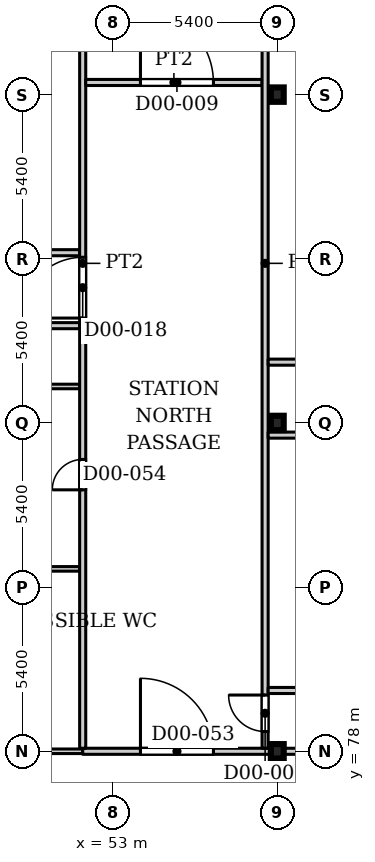
"""IFC4 building model, lengths in metres.
Left out: names, types, materials, properties, quantities, classifications, styles, units other than length and angle.
Written with IfcOpenShell. Run it as: python <this file> out.ifc"""

import sys

from ifc_helpers import new_model, si_unit, direction, frame, frame_2d, origin, origin_2d, place, context, subcontext, project, spatial, rectangle, i_section, extrude, source, transform, mapped, element, fill, save


model = new_model("IFC4")
c1 = context("Model", 3, precision=1e-05, world=origin(), true_north=direction((0.0, 1.0)))
c2 = subcontext(c1, "Body", "Model", "MODEL_VIEW")
j1 = project(units=[si_unit("LENGTHUNIT", "METRE"), si_unit("PLANEANGLEUNIT", "RADIAN")], contexts=[c1])
p1 = place(None, origin())
s1 = spatial("IfcSite", under=j1, at=p1, CompositionType="ELEMENT")
p2 = place(p1, origin())
s2 = spatial("IfcBuilding", under=s1, at=p2, CompositionType="ELEMENT")
p3 = place(p2, origin())
s3 = spatial("IfcBuildingStorey", under=s2, at=p3, CompositionType="ELEMENT", Elevation=0.0)
for number, where, z_axis, x_axis in (
    (1, (58.4, 78.0, 0.0), (0.0, 0.0, 1.0), (1.0, 0.0, 0.0)),
    (2, (58.4, 88.8, 0.0), (0.0, 0.0, 1.0), (1.0, 0.0, 0.0)),
    (3, (58.4, 99.6, 0.0), (0.0, 0.0, 1.0), (1.0, 0.0, 0.0)),
):
    element("IfcColumn", number, at=place(p3, frame(where, z_axis=z_axis, x_axis=x_axis)), inside=s3, PredefinedType="COLUMN", context=c2, shape_type="SweptSolid", body=[
        extrude(i_section(OverallWidth=0.424, OverallDepth=0.474, WebThickness=0.048, FlangeThickness=0.077, FilletRadius=0.014, at=origin_2d()), origin(), (0.0, 0.0, 1.0), 7.5),
    ])
p4 = place(p3, frame((36.45, 92.0, 0.0), z_axis=(0.0, 0.0, 1.0), x_axis=(1.0, 0.0, 0.0)))
e4 = element("IfcWall", 4, at=p4, inside=s3, PredefinedType="PARTITIONING", context=c2, shape_type="SweptSolid", body=[
    extrude(rectangle(XDim=15.45, YDim=0.2, at=frame_2d((7.725, 0.0))), origin(), (0.0, 0.0, 1.0), 7.08),
])
p5 = place(p4, frame((3.9, 0.0, 0.0)))
e5 = element("IfcOpeningElement", 5, at=p5, cuts=e4, PredefinedType="OPENING", context=c2, shape_type="SweptSolid", body=[
    extrude(rectangle(XDim=1.0, YDim=2.1, at=frame_2d((0.5, 1.05))), frame((0.0, 0.11, 0.0), z_axis=(0.0, -1.0, 0.0), x_axis=(1.0, 0.0, 0.0)), (0.0, 0.0, 1.0), 0.22),
])
p6 = place(p4, frame((11.783, 0.0, 0.0)))
e6 = element("IfcOpeningElement", 6, at=p6, cuts=e4, PredefinedType="OPENING", context=c2, shape_type="SweptSolid", body=[
    extrude(rectangle(XDim=1.0, YDim=2.1, at=frame_2d((0.5, 1.05))), frame((0.0, 0.11, 0.0), z_axis=(0.0, -1.0, 0.0), x_axis=(1.0, 0.0, 0.0)), (0.0, 0.0, 1.0), 0.22),
])
p7 = place(p3, frame((36.45, 94.4, 0.0), z_axis=(0.0, 0.0, 1.0), x_axis=(1.0, 0.0, 0.0)))
e7 = element("IfcWall", 7, at=p7, inside=s3, PredefinedType="PARTITIONING", context=c2, shape_type="SweptSolid", body=[
    extrude(rectangle(XDim=15.45, YDim=0.2, at=frame_2d((7.725, 0.0))), origin(), (0.0, 0.0, 1.0), 7.08),
])
p8 = place(p7, frame((0.567, 0.0, 0.0)))
e8 = element("IfcOpeningElement", 8, at=p8, cuts=e7, PredefinedType="OPENING", context=c2, shape_type="SweptSolid", body=[
    extrude(rectangle(XDim=1.0, YDim=2.1, at=frame_2d((0.5, 1.05))), frame((0.0, 0.11, 0.0), z_axis=(0.0, -1.0, 0.0), x_axis=(1.0, 0.0, 0.0)), (0.0, 0.0, 1.0), 0.22),
])
p9 = place(p7, frame((8.4, 0.0, 0.0)))
e9 = element("IfcOpeningElement", 9, at=p9, cuts=e7, PredefinedType="OPENING", context=c2, shape_type="SweptSolid", body=[
    extrude(rectangle(XDim=1.0, YDim=2.1, at=frame_2d((0.5, 1.05))), frame((0.0, 0.11, 0.0), z_axis=(0.0, -1.0, 0.0), x_axis=(1.0, 0.0, 0.0)), (0.0, 0.0, 1.0), 0.22),
])
p10 = place(p3, frame((48.075, 78.0, 0.0), z_axis=(0.0, 0.0, 1.0), x_axis=(1.0, 0.0, 0.0)))
e10 = element("IfcWall", 10, at=p10, inside=s3, PredefinedType="PARTITIONING", context=c2, shape_type="SweptSolid", body=[
    extrude(rectangle(XDim=3.925, YDim=0.15, at=frame_2d((1.962, 0.0))), origin(), (0.0, 0.0, 1.0), 7.08),
])
p11 = place(p10, frame((1.525, 0.0, 0.0)))
e11 = element("IfcOpeningElement", 11, at=p11, cuts=e10, PredefinedType="OPENING", context=c2, shape_type="SweptSolid", body=[
    extrude(rectangle(XDim=1.0, YDim=2.1, at=frame_2d((0.5, 1.05))), frame((0.0, 0.085, 0.0), z_axis=(0.0, -1.0, 0.0), x_axis=(1.0, 0.0, 0.0)), (0.0, 0.0, 1.0), 0.17),
])
for number, where, z_axis, x_axis in (
    (12, (48.075, 84.0, 0.0), (0.0, 0.0, 1.0), (1.0, 0.0, 0.0)),
    (13, (48.075, 90.0, 0.0), (0.0, 0.0, 1.0), (1.0, 0.0, 0.0)),
):
    element("IfcWall", number, at=place(p3, frame(where, z_axis=z_axis, x_axis=x_axis)), inside=s3, PredefinedType="PARTITIONING", context=c2, shape_type="SweptSolid", body=[
        extrude(rectangle(XDim=3.825, YDim=0.15, at=frame_2d((1.913, 0.0))), origin(), (0.0, 0.0, 1.0), 7.08),
    ])
p12 = place(p3, frame((52.0, 78.0, 0.0), z_axis=(0.0, 0.0, 1.0), x_axis=(1.0, 0.0, 0.0)))
e14 = element("IfcWall", 14, at=p12, inside=s3, PredefinedType="PARTITIONING", context=c2, shape_type="SweptSolid", body=[
    extrude(rectangle(XDim=15.9, YDim=0.2, at=frame_2d((7.95, 0.0))), origin(), (0.0, 0.0, 1.0), 7.08),
])
p13 = place(p12, frame((1.9, 0.0, 0.0)))
e15 = element("IfcOpeningElement", 15, at=p13, cuts=e14, PredefinedType="OPENING", context=c2, shape_type="SweptSolid", body=[
    extrude(rectangle(XDim=2.4, YDim=2.1, at=frame_2d((1.2, 1.05))), frame((0.0, 0.11, 0.0), z_axis=(0.0, -1.0, 0.0), x_axis=(1.0, 0.0, 0.0)), (0.0, 0.0, 1.0), 0.22),
])
p14 = place(p3, frame((52.0, 78.1, 0.0), z_axis=(0.0, 0.0, 1.0), x_axis=(0.0, 1.0, 0.0)))
e16 = element("IfcWall", 16, at=p14, inside=s3, PredefinedType="PARTITIONING", context=c2, shape_type="SweptSolid", body=[
    extrude(rectangle(XDim=31.9, YDim=0.2, at=frame_2d((15.95, 0.0))), origin(), (0.0, 0.0, 1.0), 7.08),
])
p15 = place(p14, frame((14.15, 0.0, 0.0)))
e17 = element("IfcOpeningElement", 17, at=p15, cuts=e16, PredefinedType="OPENING", context=c2, shape_type="SweptSolid", body=[
    extrude(rectangle(XDim=2.0, YDim=2.1, at=frame_2d((1.0, 1.05))), frame((0.0, 0.11, 0.0), z_axis=(0.0, -1.0, 0.0), x_axis=(1.0, 0.0, 0.0)), (0.0, 0.0, 1.0), 0.22),
])
p16 = place(p14, frame((8.5, 0.0, 0.0)))
e18 = element("IfcOpeningElement", 18, at=p16, cuts=e16, PredefinedType="OPENING", context=c2, shape_type="SweptSolid", body=[
    extrude(rectangle(XDim=1.0, YDim=2.1, at=frame_2d((0.5, 1.05))), frame((0.0, 0.11, 0.0), z_axis=(0.0, -1.0, 0.0), x_axis=(1.0, 0.0, 0.0)), (0.0, 0.0, 1.0), 0.22),
])
p17 = place(p3, frame((52.1, 100.0, 0.0), z_axis=(0.0, 0.0, 1.0), x_axis=(1.0, 0.0, 0.0)))
e19 = element("IfcWall", 19, at=p17, inside=s3, PredefinedType="PARTITIONING", context=c2, shape_type="SweptSolid", body=[
    extrude(rectangle(XDim=5.8, YDim=0.2, at=frame_2d((2.9, 0.0))), origin(), (0.0, 0.0, 1.0), 7.08),
])
p18 = place(p17, frame((1.8, 0.0, 0.0)))
e20 = element("IfcOpeningElement", 20, at=p18, cuts=e19, PredefinedType="OPENING", context=c2, shape_type="SweptSolid", body=[
    extrude(rectangle(XDim=2.4, YDim=2.1, at=frame_2d((1.2, 1.05))), frame((0.0, 0.11, 0.0), z_axis=(0.0, -1.0, 0.0), x_axis=(1.0, 0.0, 0.0)), (0.0, 0.0, 1.0), 0.22),
])
p19 = place(p3, frame((58.0, 78.1, 0.0), z_axis=(0.0, 0.0, 1.0), x_axis=(0.0, 1.0, 0.0)))
e21 = element("IfcWall", 21, at=p19, inside=s3, PredefinedType="PARTITIONING", context=c2, shape_type="SweptSolid", body=[
    extrude(rectangle(XDim=31.9, YDim=0.2, at=frame_2d((15.95, 0.0))), origin(), (0.0, 0.0, 1.0), 7.08),
])
p20 = place(p19, frame((0.55, 0.0, 0.0)))
e22 = element("IfcOpeningElement", 22, at=p20, cuts=e21, PredefinedType="OPENING", context=c2, shape_type="SweptSolid", body=[
    extrude(rectangle(XDim=1.2, YDim=2.1, at=frame_2d((0.6, 1.05))), frame((0.0, 0.11, 0.0), z_axis=(0.0, -1.0, 0.0), x_axis=(1.0, 0.0, 0.0)), (0.0, 0.0, 1.0), 0.22),
])
p21 = place(p3, frame((58.1, 80.0, 0.0), z_axis=(0.0, 0.0, 1.0), x_axis=(1.0, 0.0, 0.0)))
e23 = element("IfcWall", 23, at=p21, inside=s3, PredefinedType="PARTITIONING", context=c2, shape_type="SweptSolid", body=[
    extrude(rectangle(XDim=49.8, YDim=0.2, at=frame_2d((24.9, 0.0))), origin(), (0.0, 0.0, 1.0), 7.08),
])
p22 = place(p3, frame((58.1, 88.4, 0.0), z_axis=(0.0, 0.0, 1.0), x_axis=(1.0, 0.0, 0.0)))
e24 = element("IfcWall", 24, at=p22, inside=s3, PredefinedType="PARTITIONING", context=c2, shape_type="SweptSolid", body=[
    extrude(rectangle(XDim=49.8, YDim=0.2, at=frame_2d((24.9, 0.0))), origin(), (0.0, 0.0, 1.0), 7.08),
])
p23 = place(p22, frame((5.05, 0.0, 0.0)))
e25 = element("IfcOpeningElement", 25, at=p23, cuts=e24, PredefinedType="OPENING", context=c2, shape_type="SweptSolid", body=[
    extrude(rectangle(XDim=1.0, YDim=2.1, at=frame_2d((0.5, 1.05))), frame((0.0, 0.11, 0.0), z_axis=(0.0, -1.0, 0.0), x_axis=(1.0, 0.0, 0.0)), (0.0, 0.0, 1.0), 0.22),
])
p24 = place(p22, frame((15.414, 0.0, 0.0)))
e26 = element("IfcOpeningElement", 26, at=p24, cuts=e24, PredefinedType="OPENING", context=c2, shape_type="SweptSolid", body=[
    extrude(rectangle(XDim=1.0, YDim=2.1, at=frame_2d((0.5, 1.05))), frame((0.0, 0.11, 0.0), z_axis=(0.0, -1.0, 0.0), x_axis=(1.0, 0.0, 0.0)), (0.0, 0.0, 1.0), 0.22),
])
p25 = place(p22, frame((24.505, 0.0, 0.0)))
e27 = element("IfcOpeningElement", 27, at=p25, cuts=e24, PredefinedType="OPENING", context=c2, shape_type="SweptSolid", body=[
    extrude(rectangle(XDim=1.0, YDim=2.1, at=frame_2d((0.5, 1.05))), frame((0.0, 0.11, 0.0), z_axis=(0.0, -1.0, 0.0), x_axis=(1.0, 0.0, 0.0)), (0.0, 0.0, 1.0), 0.22),
])
p26 = place(p22, frame((34.595, 0.0, 0.0)))
e28 = element("IfcOpeningElement", 28, at=p26, cuts=e24, PredefinedType="OPENING", context=c2, shape_type="SweptSolid", body=[
    extrude(rectangle(XDim=1.0, YDim=2.1, at=frame_2d((0.5, 1.05))), frame((0.0, 0.11, 0.0), z_axis=(0.0, -1.0, 0.0), x_axis=(1.0, 0.0, 0.0)), (0.0, 0.0, 1.0), 0.22),
])
p27 = place(p22, frame((44.959, 0.0, 0.0)))
e29 = element("IfcOpeningElement", 29, at=p27, cuts=e24, PredefinedType="OPENING", context=c2, shape_type="SweptSolid", body=[
    extrude(rectangle(XDim=1.0, YDim=2.1, at=frame_2d((0.5, 1.05))), frame((0.0, 0.11, 0.0), z_axis=(0.0, -1.0, 0.0), x_axis=(1.0, 0.0, 0.0)), (0.0, 0.0, 1.0), 0.22),
])
p28 = place(p3, frame((58.1, 90.8, 0.0), z_axis=(0.0, 0.0, 1.0), x_axis=(1.0, 0.0, 0.0)))
e30 = element("IfcWall", 30, at=p28, inside=s3, PredefinedType="PARTITIONING", context=c2, shape_type="SweptSolid", body=[
    extrude(rectangle(XDim=49.8, YDim=0.2, at=frame_2d((24.9, 0.0))), origin(), (0.0, 0.0, 1.0), 7.08),
])
p29 = place(p28, frame((4.914, 0.0, 0.0)))
e31 = element("IfcOpeningElement", 31, at=p29, cuts=e30, PredefinedType="OPENING", context=c2, shape_type="SweptSolid", body=[
    extrude(rectangle(XDim=1.2, YDim=2.1, at=frame_2d((0.6, 1.05))), frame((0.0, 0.11, 0.0), z_axis=(0.0, -1.0, 0.0), x_axis=(1.0, 0.0, 0.0)), (0.0, 0.0, 1.0), 0.22),
])
p30 = place(p28, frame((15.205, 0.0, 0.0)))
e32 = element("IfcOpeningElement", 32, at=p30, cuts=e30, PredefinedType="OPENING", context=c2, shape_type="SweptSolid", body=[
    extrude(rectangle(XDim=1.0, YDim=2.1, at=frame_2d((0.5, 1.05))), frame((0.0, 0.11, 0.0), z_axis=(0.0, -1.0, 0.0), x_axis=(1.0, 0.0, 0.0)), (0.0, 0.0, 1.0), 0.22),
])
p31 = place(p28, frame((24.295, 0.0, 0.0)))
e33 = element("IfcOpeningElement", 33, at=p31, cuts=e30, PredefinedType="OPENING", context=c2, shape_type="SweptSolid", body=[
    extrude(rectangle(XDim=1.0, YDim=2.1, at=frame_2d((0.5, 1.05))), frame((0.0, 0.11, 0.0), z_axis=(0.0, -1.0, 0.0), x_axis=(1.0, 0.0, 0.0)), (0.0, 0.0, 1.0), 0.22),
])
p32 = place(p28, frame((34.659, 0.0, 0.0)))
e34 = element("IfcOpeningElement", 34, at=p32, cuts=e30, PredefinedType="OPENING", context=c2, shape_type="SweptSolid", body=[
    extrude(rectangle(XDim=1.0, YDim=2.1, at=frame_2d((0.5, 1.05))), frame((0.0, 0.11, 0.0), z_axis=(0.0, -1.0, 0.0), x_axis=(1.0, 0.0, 0.0)), (0.0, 0.0, 1.0), 0.22),
])
p33 = place(p28, frame((44.75, 0.0, 0.0)))
e35 = element("IfcOpeningElement", 35, at=p33, cuts=e30, PredefinedType="OPENING", context=c2, shape_type="SweptSolid", body=[
    extrude(rectangle(XDim=1.0, YDim=2.1, at=frame_2d((0.5, 1.05))), frame((0.0, 0.11, 0.0), z_axis=(0.0, -1.0, 0.0), x_axis=(1.0, 0.0, 0.0)), (0.0, 0.0, 1.0), 0.22),
])
m1 = source(origin(), c2, "Body", "SweptSolid", [
    extrude(rectangle(XDim=1.2, YDim=2.1, at=frame_2d((0.6, 1.05))), frame((0.0, 0.025, 0.0), z_axis=(0.0, -1.0, 0.0), x_axis=(1.0, 0.0, 0.0)), (0.0, 0.0, 1.0), 0.05),
])
p34 = place(p20, origin())
e36 = element("IfcDoor", 36, at=p34, inside=s3, OperationType="SINGLE_SWING_LEFT", PredefinedType="DOOR", context=c2, shape_type="MappedRepresentation", body=[
    mapped(m1, transform((0.0, 0.0, 0.0), x_axis=(1.0, 0.0, 0.0), y_axis=(0.0, 1.0, 0.0), z_axis=(0.0, 0.0, 1.0), scale=1.0)),
])
fill(e22, e36)
m2 = source(origin(), c2, "Body", "SweptSolid", [
    extrude(rectangle(XDim=2.4, YDim=2.1, at=frame_2d((1.2, 1.05))), frame((0.0, 0.025, 0.0), z_axis=(0.0, -1.0, 0.0), x_axis=(1.0, 0.0, 0.0)), (0.0, 0.0, 1.0), 0.05),
])
p35 = place(p18, origin())
e37 = element("IfcDoor", 37, at=p35, inside=s3, OperationType="DOUBLE_DOOR_SINGLE_SWING", PredefinedType="DOOR", context=c2, shape_type="MappedRepresentation", body=[
    mapped(m2, transform((0.0, 0.0, 0.0), x_axis=(1.0, 0.0, 0.0), y_axis=(0.0, 1.0, 0.0), z_axis=(0.0, 0.0, 1.0), scale=1.0)),
])
fill(e20, e37)
m3 = source(origin(), c2, "Body", "SweptSolid", [
    extrude(rectangle(XDim=2.0, YDim=2.1, at=frame_2d((1.0, 1.05))), frame((0.0, 0.025, 0.0), z_axis=(0.0, -1.0, 0.0), x_axis=(1.0, 0.0, 0.0)), (0.0, 0.0, 1.0), 0.05),
])
p36 = place(p15, origin())
e38 = element("IfcDoor", 38, at=p36, inside=s3, OperationType="DOUBLE_DOOR_SINGLE_SWING", PredefinedType="DOOR", context=c2, shape_type="MappedRepresentation", body=[
    mapped(m3, transform((0.0, 0.0, 0.0), x_axis=(1.0, 0.0, 0.0), y_axis=(0.0, 1.0, 0.0), z_axis=(0.0, 0.0, 1.0), scale=1.0)),
])
fill(e17, e38)
p37 = place(p13, origin())
e39 = element("IfcDoor", 39, at=p37, inside=s3, OperationType="DOUBLE_DOOR_SINGLE_SWING", PredefinedType="DOOR", context=c2, shape_type="MappedRepresentation", body=[
    mapped(m2, transform((0.0, 0.0, 0.0), x_axis=(1.0, 0.0, 0.0), y_axis=(0.0, 1.0, 0.0), z_axis=(0.0, 0.0, 1.0), scale=1.0)),
])
fill(e15, e39)
m4 = source(origin(), c2, "Body", "SweptSolid", [
    extrude(rectangle(XDim=1.0, YDim=2.1, at=frame_2d((0.5, 1.05))), frame((0.0, 0.025, 0.0), z_axis=(0.0, -1.0, 0.0), x_axis=(1.0, 0.0, 0.0)), (0.0, 0.0, 1.0), 0.05),
])
p38 = place(p16, origin())
e40 = element("IfcDoor", 40, at=p38, inside=s3, OperationType="SINGLE_SWING_LEFT", PredefinedType="DOOR", context=c2, shape_type="MappedRepresentation", body=[
    mapped(m4, transform((0.0, 0.0, 0.0), x_axis=(1.0, 0.0, 0.0), y_axis=(0.0, 1.0, 0.0), z_axis=(0.0, 0.0, 1.0), scale=1.0)),
])
fill(e18, e40)
save(model, sys.argv[1])
